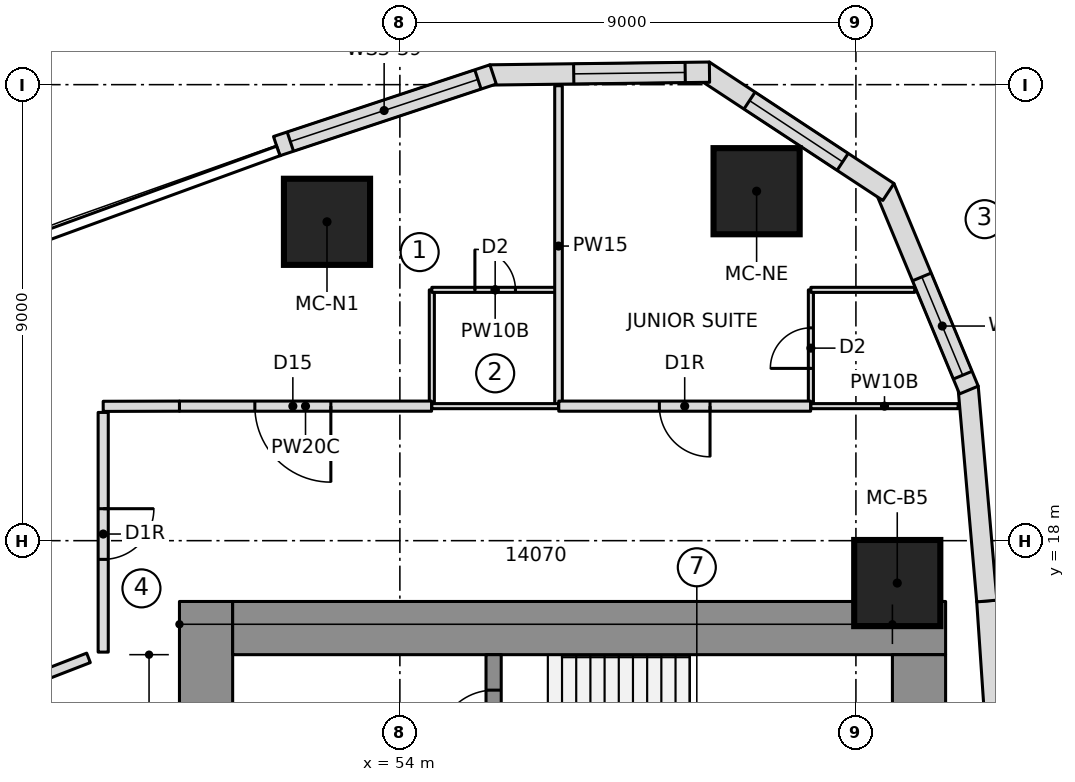
"""IFC4 building model, lengths in metres.
Left out: names, types, materials, properties, quantities, classifications, styles, units other than length and angle.
Written with IfcOpenShell. Run it as: python <this file> out.ifc"""

import sys

from ifc_helpers import new_model, si_unit, direction, frame, frame_2d, origin, origin_2d, place, context, subcontext, project, spatial, polyline, rectangle, outline, extrude, element, fill, save


model = new_model("IFC4")
c1 = context("Model", 3, precision=1e-05, world=origin(), true_north=direction((0.0, 1.0)))
c2 = subcontext(c1, "Body", "Model", "MODEL_VIEW")
j1 = project(units=[si_unit("LENGTHUNIT", "METRE"), si_unit("PLANEANGLEUNIT", "RADIAN")], contexts=[c1])
p1 = place(None, origin())
s1 = spatial("IfcSite", under=j1, at=p1, CompositionType="ELEMENT")
p2 = place(p1, origin())
s2 = spatial("IfcBuilding", under=s1, at=p2, CompositionType="ELEMENT")
p3 = place(p2, frame((0.0, 0.0, 84.9)))
s3 = spatial("IfcBuildingStorey", under=s2, at=p3, CompositionType="ELEMENT", Elevation=84.9)
p4 = place(p3, frame((50.175, 6.65, 0.0), z_axis=(0.0, 0.0, 1.0), x_axis=(0.0, 1.0, 0.0)))
e1 = element("IfcWall", 1, at=p4, inside=s3, PredefinedType="SHEAR", context=c2, shape_type="SweptSolid", body=[
    extrude(rectangle(XDim=10.15, YDim=1.05, at=frame_2d((5.075, 0.0))), origin(), (0.0, 0.0, 1.0), 3.55),
])
p5 = place(p4, frame((6.5, 0.0, 0.0)))
e2 = element("IfcOpeningElement", 2, at=p5, cuts=e1, PredefinedType="OPENING", context=c2, shape_type="SweptSolid", body=[
    extrude(rectangle(XDim=1.1, YDim=2.1, at=frame_2d((0.55, 1.05))), frame((0.0, 0.535, 0.0), z_axis=(0.0, -1.0, 0.0), x_axis=(1.0, 0.0, 0.0)), (0.0, 0.0, 1.0), 1.07),
])
p6 = place(p3, frame((50.7, 16.275, 0.0), z_axis=(0.0, 0.0, 1.0), x_axis=(1.0, 0.0, 0.0)))
e3 = element("IfcWall", 3, at=p6, inside=s3, PredefinedType="SHEAR", context=c2, shape_type="SweptSolid", body=[
    extrude(rectangle(XDim=14.07, YDim=1.05, at=frame_2d((7.035, 0.0))), origin(), (0.0, 0.0, 1.0), 3.55),
])
p7 = place(p3, frame((64.245, 9.389, 0.0), z_axis=(0.0, 0.0, 1.0), x_axis=(0.0, 1.0, 0.0)))
e4 = element("IfcWall", 4, at=p7, inside=s3, PredefinedType="SHEAR", context=c2, shape_type="SweptSolid", body=[
    extrude(rectangle(XDim=6.361, YDim=1.05, at=frame_2d((3.181, 0.0))), origin(), (0.0, 0.0, 1.0), 3.55),
])
p8 = place(p3, frame((55.85, 10.35, 0.0), z_axis=(0.0, 0.0, 1.0), x_axis=(0.0, 1.0, 0.0)))
e5 = element("IfcWall", 5, at=p8, inside=s3, PredefinedType="SHEAR", context=c2, shape_type="SweptSolid", body=[
    extrude(rectangle(XDim=5.4, YDim=0.3, at=frame_2d((2.7, 0.0))), origin(), (0.0, 0.0, 1.0), 3.55),
])
p9 = place(p8, frame((1.43, 0.0, 0.0)))
e6 = element("IfcOpeningElement", 6, at=p9, cuts=e5, PredefinedType="OPENING", context=c2, shape_type="SweptSolid", body=[
    extrude(rectangle(XDim=1.1, YDim=2.1, at=frame_2d((0.55, 1.05))), frame((0.0, 0.16, 0.0), z_axis=(0.0, -1.0, 0.0), x_axis=(1.0, 0.0, 0.0)), (0.0, 0.0, 1.0), 0.32),
])
p10 = place(p8, frame((3.6, 0.0, 0.0)))
e7 = element("IfcOpeningElement", 7, at=p10, cuts=e5, PredefinedType="OPENING", context=c2, shape_type="SweptSolid", body=[
    extrude(rectangle(XDim=1.1, YDim=2.1, at=frame_2d((0.55, 1.05))), frame((0.0, 0.16, 0.0), z_axis=(0.0, -1.0, 0.0), x_axis=(1.0, 0.0, 0.0)), (0.0, 0.0, 1.0), 0.32),
])
for number, where, z_axis, x_axis in (
    (8, (63.816, 17.164, 0.0), (0.0, 0.0, 1.0), (1.0, 0.0, 0.0)),
    (9, (61.04, 24.897, 0.0), (0.0, 0.0, 1.0), (1.0, 0.0, 0.0)),
    (10, (52.562, 24.293, 0.0), (0.0, 0.0, 1.0), (1.0, 0.0, 0.0)),
):
    element("IfcColumn", number, at=place(p3, frame(where, z_axis=z_axis, x_axis=x_axis)), inside=s3, PredefinedType="COLUMN", context=c2, shape_type="SweptSolid", body=[
        extrude(rectangle(XDim=1.7, YDim=1.7, at=origin_2d()), origin(), (0.0, 0.0, 1.0), 3.55),
    ])
p11 = place(p3, frame((65.868, 12.614, 0.0), z_axis=(0.0, 0.0, 1.0), x_axis=(-0.067724559895, 0.997704056315, 0.0)))
e11 = element("IfcWall", 11, at=p11, inside=s3, PredefinedType="NOTDEFINED", context=c2, shape_type="SweptSolid", body=[
    extrude(outline(polyline([(-0.002, -0.2), (4.209, -0.2), (4.205, 0.2), (0.002, 0.2), (-0.002, -0.2)])), origin(), (0.0, 0.0, 1.0), 3.25),
])
p12 = place(p3, frame((65.583, 16.811, 0.0), z_axis=(0.0, 0.0, 1.0), x_axis=(-0.086992730434, 0.996208946382, 0.0)))
e12 = element("IfcWall", 12, at=p12, inside=s3, PredefinedType="NOTDEFINED", context=c2, shape_type="SweptSolid", body=[
    extrude(outline(polyline([(-0.002, -0.2), (4.238, -0.2), (4.176, 0.2), (0.002, 0.2), (-0.002, -0.2)])), origin(), (0.0, 0.0, 1.0), 3.25),
])
p13 = place(p3, frame((65.217, 21.002, 0.0), z_axis=(0.0, 0.0, 1.0), x_axis=(-0.383997751971, 0.923334027577, 0.0)))
e13 = element("IfcWall", 13, at=p13, inside=s3, PredefinedType="NOTDEFINED", context=c2, shape_type="SweptSolid", body=[
    extrude(outline(polyline([(-0.031, -0.2), (4.3, -0.2), (4.177, 0.2), (0.031, 0.2), (-0.031, -0.2)])), origin(), (0.0, 0.0, 1.0), 3.25),
])
p14 = place(p13, frame((0.287, 0.0, 0.6)))
e14 = element("IfcOpeningElement", 14, at=p14, cuts=e13, PredefinedType="OPENING", context=c2, shape_type="SweptSolid", body=[
    extrude(outline(polyline([(0.0, 1.4), (0.08, 1.802), (0.308, 2.142), (0.648, 2.37), (1.05, 2.45), (1.452, 2.37), (1.792, 2.142), (2.02, 1.802), (2.1, 1.4), (2.1, 1.05), (2.02, 0.648), (1.792, 0.308), (1.452, 0.08), (1.05, 0.0), (0.648, 0.08), (0.308, 0.308), (0.08, 0.648), (0.0, 1.05), (0.0, 1.4)])), frame((0.0, 0.21, 0.0), z_axis=(0.0, -1.0, 0.0), x_axis=(1.0, 0.0, 0.0)), (0.0, 0.0, 1.0), 0.42),
])
p15 = place(p3, frame((63.59, 24.916, 0.0), z_axis=(0.0, 0.0, 1.0), x_axis=(-0.835340523653, 0.549732852887, 0.0)))
e15 = element("IfcWall", 15, at=p15, inside=s3, PredefinedType="NOTDEFINED", context=c2, shape_type="SweptSolid", body=[
    extrude(outline(polyline([(-0.061, -0.2), (4.3, -0.2), (4.178, 0.2), (0.061, 0.2), (-0.061, -0.2)])), origin(), (0.0, 0.0, 1.0), 3.25),
])
p16 = place(p15, frame((1.02, 0.0, 0.6)))
e16 = element("IfcOpeningElement", 16, at=p16, cuts=e15, PredefinedType="OPENING", context=c2, shape_type="SweptSolid", body=[
    extrude(outline(polyline([(0.0, 1.35), (0.084, 1.771), (0.322, 2.128), (0.679, 2.366), (1.1, 2.45), (1.521, 2.366), (1.878, 2.128), (2.116, 1.771), (2.2, 1.35), (2.2, 1.1), (2.116, 0.679), (1.878, 0.322), (1.521, 0.084), (1.1, 0.0), (0.679, 0.084), (0.322, 0.322), (0.084, 0.679), (0.0, 1.1), (0.0, 1.35)])), frame((0.0, 0.21, 0.0), z_axis=(0.0, -1.0, 0.0), x_axis=(1.0, 0.0, 0.0)), (0.0, 0.0, 1.0), 0.42),
])
p17 = place(p3, frame((60.049, 27.246, 0.0), z_axis=(0.0, 0.0, 1.0), x_axis=(-0.999919718849, -0.012671063772, 0.0)))
e17 = element("IfcWall", 17, at=p17, inside=s3, PredefinedType="NOTDEFINED", context=c2, shape_type="SweptSolid", body=[
    extrude(outline(polyline([(-0.061, -0.2), (4.27, -0.2), (4.208, 0.2), (0.061, 0.2), (-0.061, -0.2)])), origin(), (0.0, 0.0, 1.0), 3.25),
])
p18 = place(p17, frame((0.418, 0.0, 0.6)))
e18 = element("IfcOpeningElement", 18, at=p18, cuts=e17, PredefinedType="OPENING", context=c2, shape_type="SweptSolid", body=[
    extrude(outline(polyline([(0.0, 1.35), (0.084, 1.771), (0.322, 2.128), (0.679, 2.366), (1.1, 2.45), (1.521, 2.366), (1.878, 2.128), (2.116, 1.771), (2.2, 1.35), (2.2, 1.1), (2.116, 0.679), (1.878, 0.322), (1.521, 0.084), (1.1, 0.0), (0.679, 0.084), (0.322, 0.322), (0.084, 0.679), (0.0, 1.1), (0.0, 1.35)])), frame((0.0, 0.21, 0.0), z_axis=(0.0, -1.0, 0.0), x_axis=(1.0, 0.0, 0.0)), (0.0, 0.0, 1.0), 0.42),
])
p19 = place(p3, frame((55.81, 27.192, 0.0), z_axis=(0.0, 0.0, 1.0), x_axis=(-0.94925004851, -0.314522408429, 0.0)))
e19 = element("IfcWall", 19, at=p19, inside=s3, PredefinedType="NOTDEFINED", context=c2, shape_type="SweptSolid", body=[
    extrude(outline(polyline([(-0.031, -0.2), (4.468, -0.2), (4.468, 0.2), (0.031, 0.2), (-0.031, -0.2)])), origin(), (0.0, 0.0, 1.0), 3.25),
])
p20 = place(p19, frame((0.284, 0.0, 0.9)))
e20 = element("IfcOpeningElement", 20, at=p20, cuts=e19, PredefinedType="OPENING", context=c2, shape_type="SweptSolid", body=[
    extrude(rectangle(XDim=3.9, YDim=1.8, at=frame_2d((1.95, 0.9))), frame((0.0, 0.21, 0.0), z_axis=(0.0, -1.0, 0.0), x_axis=(1.0, 0.0, 0.0)), (0.0, 0.0, 1.0), 0.42),
])
p21 = place(p3, frame((54.631, 20.65, 0.0), z_axis=(0.0, 0.0, 1.0), x_axis=(0.0, 1.0, 0.0)))
e21 = element("IfcWall", 21, at=p21, inside=s3, PredefinedType="PARTITIONING", context=c2, shape_type="SweptSolid", body=[
    extrude(rectangle(XDim=2.3, YDim=0.1, at=frame_2d((1.15, 0.0))), origin(), (0.0, 0.0, 1.0), 3.25),
])
p22 = place(p3, frame((54.631, 22.95, 0.0), z_axis=(0.0, 0.0, 1.0), x_axis=(1.0, 0.0, 0.0)))
e22 = element("IfcWall", 22, at=p22, inside=s3, PredefinedType="PARTITIONING", context=c2, shape_type="SweptSolid", body=[
    extrude(rectangle(XDim=2.5, YDim=0.1, at=frame_2d((1.25, 0.0))), origin(), (0.0, 0.0, 1.0), 3.25),
])
p23 = place(p22, frame((0.85, 0.0, 0.0)))
e23 = element("IfcOpeningElement", 23, at=p23, cuts=e22, PredefinedType="OPENING", context=c2, shape_type="SweptSolid", body=[
    extrude(rectangle(XDim=0.8, YDim=2.1, at=frame_2d((0.4, 1.05))), frame((0.0, 0.06, 0.0), z_axis=(0.0, -1.0, 0.0), x_axis=(1.0, 0.0, 0.0)), (0.0, 0.0, 1.0), 0.12),
])
p24 = place(p3, frame((62.111, 20.65, 0.0), z_axis=(0.0, 0.0, 1.0), x_axis=(0.0, 1.0, 0.0)))
e24 = element("IfcWall", 24, at=p24, inside=s3, PredefinedType="PARTITIONING", context=c2, shape_type="SweptSolid", body=[
    extrude(rectangle(XDim=2.3, YDim=0.1, at=frame_2d((1.15, 0.0))), origin(), (0.0, 0.0, 1.0), 3.25),
])
p25 = place(p24, frame((0.75, 0.0, 0.0)))
e25 = element("IfcOpeningElement", 25, at=p25, cuts=e24, PredefinedType="OPENING", context=c2, shape_type="SweptSolid", body=[
    extrude(rectangle(XDim=0.8, YDim=2.1, at=frame_2d((0.4, 1.05))), frame((0.0, 0.06, 0.0), z_axis=(0.0, -1.0, 0.0), x_axis=(1.0, 0.0, 0.0)), (0.0, 0.0, 1.0), 0.12),
])
p26 = place(p3, frame((62.111, 22.95, 0.0), z_axis=(0.0, 0.0, 1.0), x_axis=(1.0, 0.0, 0.0)))
e26 = element("IfcWall", 26, at=p26, inside=s3, PredefinedType="PARTITIONING", context=c2, shape_type="SweptSolid", body=[
    extrude(rectangle(XDim=2.049, YDim=0.1, at=frame_2d((1.025, 0.0))), origin(), (0.0, 0.0, 1.0), 3.25),
])
p27 = place(p3, frame((57.131, 20.65, 0.0), z_axis=(0.0, 0.0, 1.0), x_axis=(0.0, 1.0, 0.0)))
e27 = element("IfcWall", 27, at=p27, inside=s3, PredefinedType="PARTITIONING", context=c2, shape_type="SweptSolid", body=[
    extrude(rectangle(XDim=6.329, YDim=0.15, at=frame_2d((3.165, 0.0))), origin(), (0.0, 0.0, 1.0), 3.25),
])
p28 = place(p3, frame((54.625, 20.655, 0.0), z_axis=(0.0, 0.0, 1.0), x_axis=(-1.0, 0.0, 0.0)))
e28 = element("IfcWall", 28, at=p28, inside=s3, PredefinedType="PARTITIONING", context=c2, shape_type="SweptSolid", body=[
    extrude(rectangle(XDim=4.976, YDim=0.2, at=frame_2d((2.488, 0.0))), origin(), (0.0, 0.0, 1.0), 3.25),
])
p29 = place(p28, frame((1.988, 0.0, 0.0)))
e29 = element("IfcOpeningElement", 29, at=p29, cuts=e28, PredefinedType="OPENING", context=c2, shape_type="SweptSolid", body=[
    extrude(rectangle(XDim=1.5, YDim=2.1, at=frame_2d((0.75, 1.05))), frame((0.0, 0.11, 0.0), z_axis=(0.0, -1.0, 0.0), x_axis=(1.0, 0.0, 0.0)), (0.0, 0.0, 1.0), 0.22),
])
p30 = place(p3, frame((62.106, 20.655, 0.0), z_axis=(0.0, 0.0, 1.0), x_axis=(-1.0, 0.0, 0.0)))
e30 = element("IfcWall", 30, at=p30, inside=s3, PredefinedType="PARTITIONING", context=c2, shape_type="SweptSolid", body=[
    extrude(rectangle(XDim=4.971, YDim=0.2, at=frame_2d((2.485, 0.0))), origin(), (0.0, 0.0, 1.0), 3.25),
])
p31 = place(p30, frame((1.985, 0.0, 0.0)))
e31 = element("IfcOpeningElement", 31, at=p31, cuts=e30, PredefinedType="OPENING", context=c2, shape_type="SweptSolid", body=[
    extrude(rectangle(XDim=1.0, YDim=2.1, at=frame_2d((0.5, 1.05))), frame((0.0, 0.11, 0.0), z_axis=(0.0, -1.0, 0.0), x_axis=(1.0, 0.0, 0.0)), (0.0, 0.0, 1.0), 0.22),
])
p32 = place(p3, frame((57.131, 20.655, 0.0), z_axis=(0.0, 0.0, 1.0), x_axis=(-1.0, 0.0, 0.0)))
e32 = element("IfcWall", 32, at=p32, inside=s3, PredefinedType="PARTITIONING", context=c2, shape_type="SweptSolid", body=[
    extrude(rectangle(XDim=2.5, YDim=0.1, at=frame_2d((1.25, 0.0))), origin(), (0.0, 0.0, 1.0), 3.25),
])
p33 = place(p3, frame((65.017, 20.655, 0.0), z_axis=(0.0, 0.0, 1.0), x_axis=(-1.0, 0.0, 0.0)))
e33 = element("IfcWall", 33, at=p33, inside=s3, PredefinedType="PARTITIONING", context=c2, shape_type="SweptSolid", body=[
    extrude(rectangle(XDim=2.906, YDim=0.1, at=frame_2d((1.453, 0.0))), origin(), (0.0, 0.0, 1.0), 3.25),
])
p34 = place(p3, frame((47.855, 15.687, 0.0), z_axis=(0.0, 0.0, 1.0), x_axis=(-0.932373677254, -0.361495955668, 0.0)))
e34 = element("IfcWall", 34, at=p34, inside=s3, PredefinedType="PARTITIONING", context=c2, shape_type="SweptSolid", body=[
    extrude(rectangle(XDim=5.431, YDim=0.2, at=frame_2d((2.716, 0.0))), origin(), (0.0, 0.0, 1.0), 3.25),
])
p35 = place(p3, frame((49.65, 20.655, 0.0), z_axis=(0.0, 0.0, 1.0), x_axis=(-0.999996196879, -0.002757938895, 0.0)))
e35 = element("IfcWall", 35, at=p35, inside=s3, PredefinedType="PARTITIONING", context=c2, shape_type="SweptSolid", body=[
    extrude(rectangle(XDim=1.505, YDim=0.2, at=frame_2d((0.752, 0.0))), origin(), (0.0, 0.0, 1.0), 3.25),
])
p36 = place(p3, frame((48.145, 20.531, 0.0), z_axis=(0.0, 0.0, 1.0), x_axis=(5.1610239e-05, -0.999999998668, 0.0)))
e36 = element("IfcWall", 36, at=p36, inside=s3, PredefinedType="PARTITIONING", context=c2, shape_type="SweptSolid", body=[
    extrude(rectangle(XDim=4.73, YDim=0.2, at=frame_2d((2.365, 0.0))), origin(), (0.0, 0.0, 1.0), 3.25),
])
p37 = place(p36, frame((1.9, 0.0, 0.0)))
e37 = element("IfcOpeningElement", 37, at=p37, cuts=e36, PredefinedType="OPENING", context=c2, shape_type="SweptSolid", body=[
    extrude(rectangle(XDim=1.0, YDim=2.1, at=frame_2d((0.5, 1.05))), frame((0.0, 0.11, 0.0), z_axis=(0.0, -1.0, 0.0), x_axis=(1.0, 0.0, 0.0)), (0.0, 0.0, 1.0), 0.22),
])
p38 = place(p14, origin())
e38 = element("IfcWindow", 38, at=p38, inside=s3, PartitioningType="SINGLE_PANEL", PredefinedType="WINDOW", context=c2, shape_type="SweptSolid", body=[
    extrude(outline(polyline([(0.0, 1.4), (0.08, 1.802), (0.308, 2.142), (0.648, 2.37), (1.05, 2.45), (1.452, 2.37), (1.792, 2.142), (2.02, 1.802), (2.1, 1.4), (2.1, 1.05), (2.02, 0.648), (1.792, 0.308), (1.452, 0.08), (1.05, 0.0), (0.648, 0.08), (0.308, 0.308), (0.08, 0.648), (0.0, 1.05), (0.0, 1.4)])), frame((0.0, 0.17, 0.0), z_axis=(0.0, -1.0, 0.0), x_axis=(1.0, 0.0, 0.0)), (0.0, 0.0, 1.0), 0.06),
])
fill(e14, e38)
p39 = place(p16, origin())
e39 = element("IfcWindow", 39, at=p39, inside=s3, PartitioningType="SINGLE_PANEL", PredefinedType="WINDOW", context=c2, shape_type="SweptSolid", body=[
    extrude(outline(polyline([(0.0, 1.35), (0.084, 1.771), (0.322, 2.128), (0.679, 2.366), (1.1, 2.45), (1.521, 2.366), (1.878, 2.128), (2.116, 1.771), (2.2, 1.35), (2.2, 1.1), (2.116, 0.679), (1.878, 0.322), (1.521, 0.084), (1.1, 0.0), (0.679, 0.084), (0.322, 0.322), (0.084, 0.679), (0.0, 1.1), (0.0, 1.35)])), frame((0.0, 0.17, 0.0), z_axis=(0.0, -1.0, 0.0), x_axis=(1.0, 0.0, 0.0)), (0.0, 0.0, 1.0), 0.06),
])
fill(e16, e39)
p40 = place(p18, origin())
e40 = element("IfcWindow", 40, at=p40, inside=s3, PartitioningType="SINGLE_PANEL", PredefinedType="WINDOW", context=c2, shape_type="SweptSolid", body=[
    extrude(outline(polyline([(0.0, 1.35), (0.084, 1.771), (0.322, 2.128), (0.679, 2.366), (1.1, 2.45), (1.521, 2.366), (1.878, 2.128), (2.116, 1.771), (2.2, 1.35), (2.2, 1.1), (2.116, 0.679), (1.878, 0.322), (1.521, 0.084), (1.1, 0.0), (0.679, 0.084), (0.322, 0.322), (0.084, 0.679), (0.0, 1.1), (0.0, 1.35)])), frame((0.0, 0.17, 0.0), z_axis=(0.0, -1.0, 0.0), x_axis=(1.0, 0.0, 0.0)), (0.0, 0.0, 1.0), 0.06),
])
fill(e18, e40)
p41 = place(p20, origin())
e41 = element("IfcWindow", 41, at=p41, inside=s3, PartitioningType="SINGLE_PANEL", PredefinedType="WINDOW", context=c2, shape_type="SweptSolid", body=[
    extrude(rectangle(XDim=3.9, YDim=1.8, at=frame_2d((1.95, 0.9))), frame((0.0, 0.17, 0.0), z_axis=(0.0, -1.0, 0.0), x_axis=(1.0, 0.0, 0.0)), (0.0, 0.0, 1.0), 0.06),
])
fill(e20, e41)
p42 = place(p23, origin())
e42 = element("IfcDoor", 42, at=p42, inside=s3, OperationType="SINGLE_SWING_LEFT", PredefinedType="DOOR", context=c2, shape_type="SweptSolid", body=[
    extrude(rectangle(XDim=0.8, YDim=2.1, at=frame_2d((0.4, 1.05))), frame((0.0, 0.025, 0.0), z_axis=(0.0, -1.0, 0.0), x_axis=(1.0, 0.0, 0.0)), (0.0, 0.0, 1.0), 0.05),
])
fill(e23, e42)
p43 = place(p25, origin())
e43 = element("IfcDoor", 43, at=p43, inside=s3, OperationType="SINGLE_SWING_LEFT", PredefinedType="DOOR", context=c2, shape_type="SweptSolid", body=[
    extrude(rectangle(XDim=0.8, YDim=2.1, at=frame_2d((0.4, 1.05))), frame((0.0, 0.025, 0.0), z_axis=(0.0, -1.0, 0.0), x_axis=(1.0, 0.0, 0.0)), (0.0, 0.0, 1.0), 0.05),
])
fill(e25, e43)
p44 = place(p29, origin())
e44 = element("IfcDoor", 44, at=p44, inside=s3, OperationType="DOUBLE_DOOR_SINGLE_SWING", PredefinedType="DOOR", context=c2, shape_type="SweptSolid", body=[
    extrude(rectangle(XDim=1.5, YDim=2.1, at=frame_2d((0.75, 1.05))), frame((0.0, 0.025, 0.0), z_axis=(0.0, -1.0, 0.0), x_axis=(1.0, 0.0, 0.0)), (0.0, 0.0, 1.0), 0.05),
])
fill(e29, e44)
p45 = place(p31, origin())
e45 = element("IfcDoor", 45, at=p45, inside=s3, OperationType="SINGLE_SWING_RIGHT", PredefinedType="DOOR", context=c2, shape_type="SweptSolid", body=[
    extrude(rectangle(XDim=1.0, YDim=2.1, at=frame_2d((0.5, 1.05))), frame((0.0, 0.025, 0.0), z_axis=(0.0, -1.0, 0.0), x_axis=(1.0, 0.0, 0.0)), (0.0, 0.0, 1.0), 0.05),
])
fill(e31, e45)
p46 = place(p37, origin())
e46 = element("IfcDoor", 46, at=p46, inside=s3, OperationType="SINGLE_SWING_RIGHT", PredefinedType="DOOR", context=c2, shape_type="SweptSolid", body=[
    extrude(rectangle(XDim=1.0, YDim=2.1, at=frame_2d((0.5, 1.05))), frame((0.0, 0.025, 0.0), z_axis=(0.0, -1.0, 0.0), x_axis=(1.0, 0.0, 0.0)), (0.0, 0.0, 1.0), 0.05),
])
fill(e37, e46)
p47 = place(p10, origin())
e47 = element("IfcDoor", 47, at=p47, inside=s3, OperationType="SINGLE_SWING_RIGHT", PredefinedType="DOOR", context=c2, shape_type="SweptSolid", body=[
    extrude(rectangle(XDim=1.1, YDim=2.1, at=frame_2d((0.55, 1.05))), frame((0.0, 0.025, 0.0), z_axis=(0.0, -1.0, 0.0), x_axis=(1.0, 0.0, 0.0)), (0.0, 0.0, 1.0), 0.05),
])
fill(e7, e47)
save(model, sys.argv[1])
